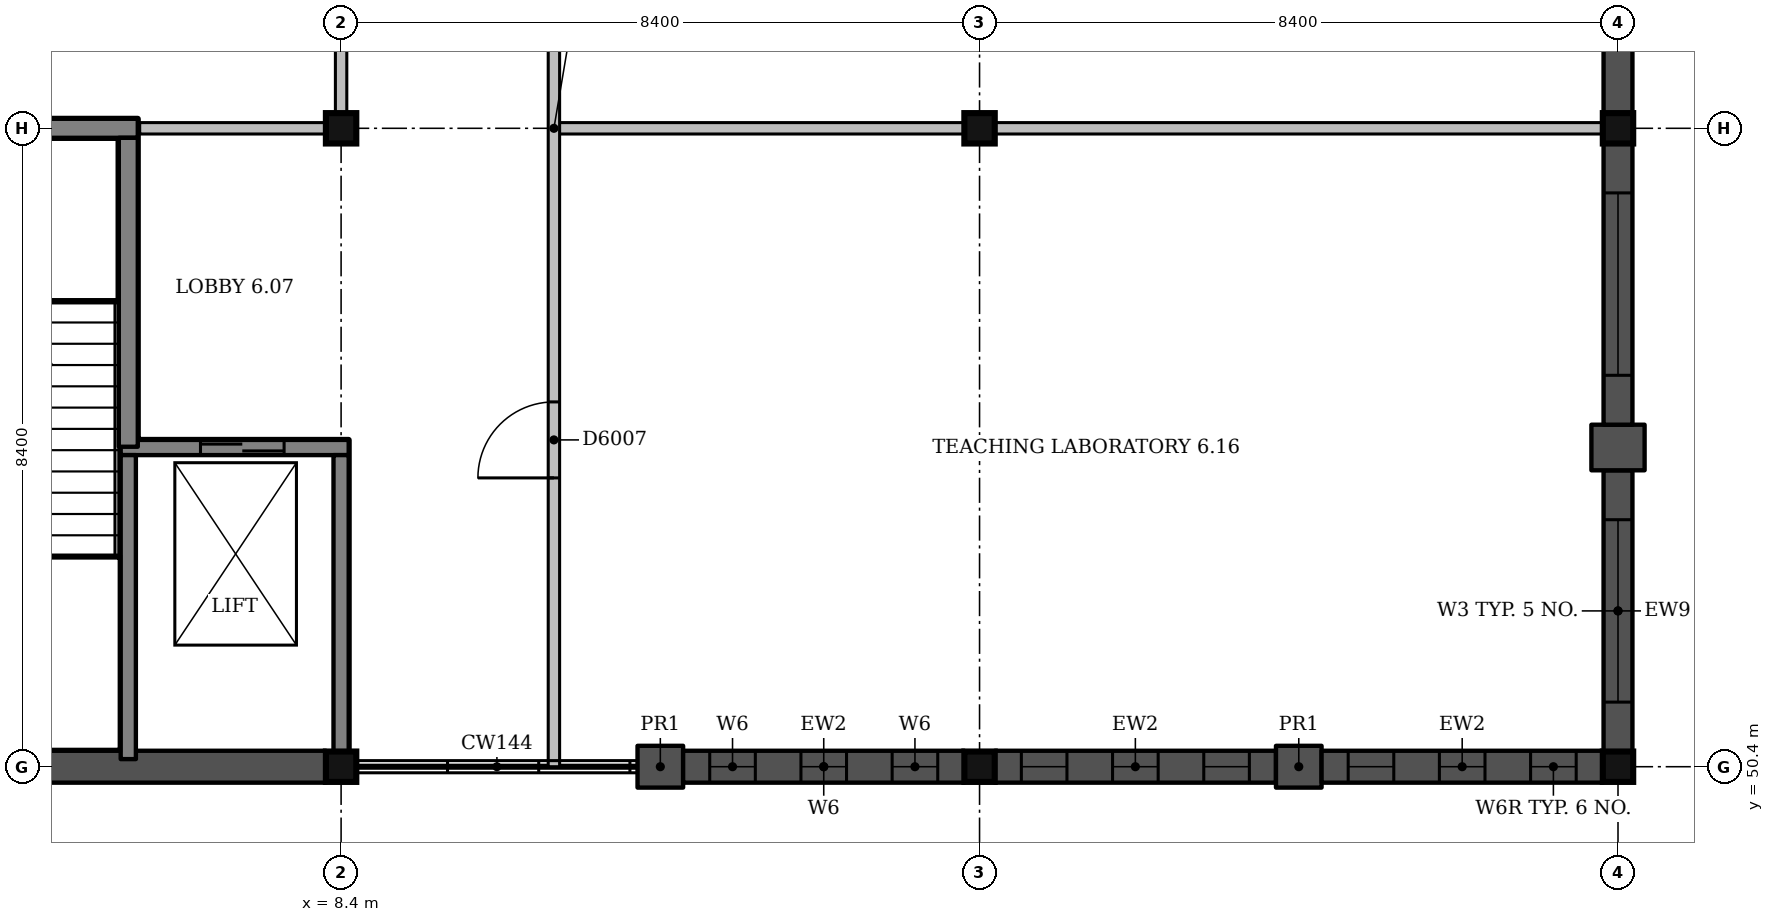
"""IFC4 building model, lengths in metres.
Left out: names, types, materials, properties, quantities, classifications, styles, units other than length and angle.
Written with IfcOpenShell. Run it as: python <this file> out.ifc"""

import sys

from ifc_helpers import new_model, si_unit, direction, frame, frame_2d, origin, origin_2d, place, context, subcontext, project, spatial, rectangle, extrude, element, fill, save


model = new_model("IFC4")
c1 = context("Model", 3, precision=1e-05, world=origin(), true_north=direction((0.0, 1.0)))
c2 = subcontext(c1, "Body", "Model", "MODEL_VIEW")
j1 = project(units=[si_unit("LENGTHUNIT", "METRE"), si_unit("PLANEANGLEUNIT", "RADIAN")], contexts=[c1])
p1 = place(None, origin())
s1 = spatial("IfcSite", under=j1, at=p1, CompositionType="ELEMENT")
p2 = place(p1, origin())
s2 = spatial("IfcBuilding", under=s1, at=p2, CompositionType="ELEMENT")
p3 = place(p2, frame((0.0, 0.0, 27.0)))
s3 = spatial("IfcBuildingStorey", under=s2, at=p3, CompositionType="ELEMENT", Elevation=27.0)
for number, where, z_axis, x_axis in (
    (1, (8.4, 50.4, 0.0), (0.0, 0.0, 1.0), (1.0, 0.0, 0.0)),
    (2, (8.4, 58.8, 0.0), (0.0, 0.0, 1.0), (1.0, 0.0, 0.0)),
    (3, (16.8, 50.4, 0.0), (0.0, 0.0, 1.0), (1.0, 0.0, 0.0)),
    (4, (16.8, 58.8, 0.0), (0.0, 0.0, 1.0), (1.0, 0.0, 0.0)),
    (5, (25.2, 50.4, 0.0), (0.0, 0.0, 1.0), (1.0, 0.0, 0.0)),
    (6, (25.2, 58.8, 0.0), (0.0, 0.0, 1.0), (1.0, 0.0, 0.0)),
):
    element("IfcColumn", number, at=place(p3, frame(where, z_axis=z_axis, x_axis=x_axis)), inside=s3, PredefinedType="COLUMN", context=c2, shape_type="SweptSolid", body=[
        extrude(rectangle(XDim=0.4, YDim=0.4, at=origin_2d()), origin(), (0.0, 0.0, 1.0), 4.5),
    ])
p4 = place(p3, frame((5.5, 54.6, 0.0), z_axis=(0.0, 0.0, 1.0), x_axis=(1.0, 0.0, 0.0)))
e7 = element("IfcWall", 7, at=p4, inside=s3, PredefinedType="SHEAR", context=c2, shape_type="SweptSolid", body=[
    extrude(rectangle(XDim=3.0, YDim=0.2, at=frame_2d((1.5, 0.0))), origin(), (0.0, 0.0, 1.0), 4.5),
])
p5 = place(p4, frame((1.05, 0.0, 0.0)))
e8 = element("IfcOpeningElement", 8, at=p5, cuts=e7, PredefinedType="OPENING", context=c2, shape_type="SweptSolid", body=[
    extrude(rectangle(XDim=1.1, YDim=2.1, at=frame_2d((0.55, 1.05))), frame((0.0, 0.11, 0.0), z_axis=(0.0, -1.0, 0.0), x_axis=(1.0, 0.0, 0.0)), (0.0, 0.0, 1.0), 0.22),
])
p6 = place(p3, frame((5.6, 50.5, 0.0), z_axis=(0.0, 0.0, 1.0), x_axis=(0.0, 1.0, 0.0)))
e9 = element("IfcWall", 9, at=p6, inside=s3, PredefinedType="SHEAR", context=c2, shape_type="SweptSolid", body=[
    extrude(rectangle(XDim=4.0, YDim=0.2, at=frame_2d((2.0, 0.0))), origin(), (0.0, 0.0, 1.0), 4.5),
])
p7 = place(p3, frame((8.4, 50.6, 0.0), z_axis=(0.0, 0.0, 1.0), x_axis=(0.0, 1.0, 0.0)))
e10 = element("IfcWall", 10, at=p7, inside=s3, PredefinedType="SHEAR", context=c2, shape_type="SweptSolid", body=[
    extrude(rectangle(XDim=3.9, YDim=0.2, at=frame_2d((1.95, 0.0))), origin(), (0.0, 0.0, 1.0), 4.5),
])
p8 = place(p3, frame((0.2, 58.8, 0.0), z_axis=(0.0, 0.0, 1.0), x_axis=(1.0, 0.0, 0.0)))
e11 = element("IfcWall", 11, at=p8, inside=s3, PredefinedType="SHEAR", context=c2, shape_type="SweptSolid", body=[
    extrude(rectangle(XDim=5.525, YDim=0.25, at=frame_2d((2.763, 0.0))), origin(), (0.0, 0.0, 1.0), 4.5),
])
p9 = place(p8, frame((2.15, 0.0, 0.0)))
e12 = element("IfcOpeningElement", 12, at=p9, cuts=e11, PredefinedType="OPENING", context=c2, shape_type="SweptSolid", body=[
    extrude(rectangle(XDim=1.0, YDim=2.1, at=frame_2d((0.5, 1.05))), frame((0.0, 0.135, 0.0), z_axis=(0.0, -1.0, 0.0), x_axis=(1.0, 0.0, 0.0)), (0.0, 0.0, 1.0), 0.27),
])
p10 = place(p3, frame((5.6, 54.61, 0.0), z_axis=(0.0, 0.0, 1.0), x_axis=(0.0, 1.0, 0.0)))
e13 = element("IfcWall", 13, at=p10, inside=s3, PredefinedType="SHEAR", context=c2, shape_type="SweptSolid", body=[
    extrude(rectangle(XDim=4.065, YDim=0.25, at=frame_2d((2.032, 0.0))), origin(), (0.0, 0.0, 1.0), 4.5),
])
p11 = place(p3, frame((25.2, 50.6, 0.0), z_axis=(0.0, 0.0, 1.0), x_axis=(0.0, 1.0, 0.0)))
e14 = element("IfcWall", 14, at=p11, inside=s3, PredefinedType="SOLIDWALL", context=c2, shape_type="SweptSolid", body=[
    extrude(rectangle(XDim=3.7, YDim=0.38, at=frame_2d((1.85, 0.0))), origin(), (0.0, 0.0, 1.0), 4.2),
])
p12 = place(p11, frame((0.65, 0.0, 1.2)))
e15 = element("IfcOpeningElement", 15, at=p12, cuts=e14, PredefinedType="OPENING", context=c2, shape_type="SweptSolid", body=[
    extrude(rectangle(XDim=2.4, YDim=1.5, at=frame_2d((1.2, 0.75))), frame((0.0, 0.2, 0.0), z_axis=(0.0, -1.0, 0.0), x_axis=(1.0, 0.0, 0.0)), (0.0, 0.0, 1.0), 0.4),
])
p13 = place(p3, frame((25.2, 54.3, 0.0), z_axis=(0.0, 0.0, 1.0), x_axis=(0.0, 1.0, 0.0)))
e16 = element("IfcWall", 16, at=p13, inside=s3, PredefinedType="SOLIDWALL", context=c2, shape_type="SweptSolid", body=[
    extrude(rectangle(XDim=0.6, YDim=0.7, at=frame_2d((0.3, 0.0))), origin(), (0.0, 0.0, 1.0), 4.2),
])
p14 = place(p3, frame((25.2, 54.9, 0.0), z_axis=(0.0, 0.0, 1.0), x_axis=(0.0, 1.0, 0.0)))
e17 = element("IfcWall", 17, at=p14, inside=s3, PredefinedType="SOLIDWALL", context=c2, shape_type="SweptSolid", body=[
    extrude(rectangle(XDim=3.7, YDim=0.38, at=frame_2d((1.85, 0.0))), origin(), (0.0, 0.0, 1.0), 4.2),
])
p15 = place(p14, frame((0.65, 0.0, 1.2)))
e18 = element("IfcOpeningElement", 18, at=p15, cuts=e17, PredefinedType="OPENING", context=c2, shape_type="SweptSolid", body=[
    extrude(rectangle(XDim=2.4, YDim=1.5, at=frame_2d((1.2, 0.75))), frame((0.0, 0.2, 0.0), z_axis=(0.0, -1.0, 0.0), x_axis=(1.0, 0.0, 0.0)), (0.0, 0.0, 1.0), 0.4),
])
p16 = place(p3, frame((25.2, 59.0, 0.0), z_axis=(0.0, 0.0, 1.0), x_axis=(0.0, 1.0, 0.0)))
e19 = element("IfcWall", 19, at=p16, inside=s3, PredefinedType="SOLIDWALL", context=c2, shape_type="SweptSolid", body=[
    extrude(rectangle(XDim=2.367, YDim=0.38, at=frame_2d((1.183, 0.0))), origin(), (0.0, 0.0, 1.0), 3.35),
])
p17 = place(p3, frame((4.5, 50.4, 0.0), z_axis=(0.0, 0.0, 1.0), x_axis=(1.0, 0.0, 0.0)))
e20 = element("IfcWall", 20, at=p17, inside=s3, PredefinedType="SOLIDWALL", context=c2, shape_type="SweptSolid", body=[
    extrude(rectangle(XDim=3.7, YDim=0.42, at=frame_2d((1.85, 0.0))), origin(), (0.0, 0.0, 1.0), 3.65),
])
p18 = place(p3, frame((12.3, 50.4, 0.0), z_axis=(0.0, 0.0, 1.0), x_axis=(1.0, 0.0, 0.0)))
e21 = element("IfcWall", 21, at=p18, inside=s3, PredefinedType="SOLIDWALL", context=c2, shape_type="SweptSolid", body=[
    extrude(rectangle(XDim=0.6, YDim=0.55, at=frame_2d((0.3, 0.0))), origin(), (0.0, 0.0, 1.0), 4.2),
])
p19 = place(p3, frame((12.9, 50.4, 0.0), z_axis=(0.0, 0.0, 1.0), x_axis=(1.0, 0.0, 0.0)))
e22 = element("IfcWall", 22, at=p19, inside=s3, PredefinedType="SOLIDWALL", context=c2, shape_type="SweptSolid", body=[
    extrude(rectangle(XDim=3.7, YDim=0.42, at=frame_2d((1.85, 0.0))), origin(), (0.0, 0.0, 1.0), 4.2),
])
p20 = place(p19, frame((0.35, 0.0, 1.0)))
e23 = element("IfcOpeningElement", 23, at=p20, cuts=e22, PredefinedType="OPENING", context=c2, shape_type="SweptSolid", body=[
    extrude(rectangle(XDim=0.6, YDim=2.1, at=frame_2d((0.3, 1.05))), frame((0.0, 0.22, 0.0), z_axis=(0.0, -1.0, 0.0), x_axis=(1.0, 0.0, 0.0)), (0.0, 0.0, 1.0), 0.44),
])
p21 = place(p19, frame((1.55, 0.0, 1.0)))
e24 = element("IfcOpeningElement", 24, at=p21, cuts=e22, PredefinedType="OPENING", context=c2, shape_type="SweptSolid", body=[
    extrude(rectangle(XDim=0.6, YDim=2.1, at=frame_2d((0.3, 1.05))), frame((0.0, 0.22, 0.0), z_axis=(0.0, -1.0, 0.0), x_axis=(1.0, 0.0, 0.0)), (0.0, 0.0, 1.0), 0.44),
])
p22 = place(p19, frame((2.75, 0.0, 1.0)))
e25 = element("IfcOpeningElement", 25, at=p22, cuts=e22, PredefinedType="OPENING", context=c2, shape_type="SweptSolid", body=[
    extrude(rectangle(XDim=0.6, YDim=2.1, at=frame_2d((0.3, 1.05))), frame((0.0, 0.22, 0.0), z_axis=(0.0, -1.0, 0.0), x_axis=(1.0, 0.0, 0.0)), (0.0, 0.0, 1.0), 0.44),
])
p23 = place(p3, frame((17.0, 50.4, 0.0), z_axis=(0.0, 0.0, 1.0), x_axis=(1.0, 0.0, 0.0)))
e26 = element("IfcWall", 26, at=p23, inside=s3, PredefinedType="SOLIDWALL", context=c2, shape_type="SweptSolid", body=[
    extrude(rectangle(XDim=3.7, YDim=0.42, at=frame_2d((1.85, 0.0))), origin(), (0.0, 0.0, 1.0), 3.35),
])
p24 = place(p23, frame((0.35, 0.0, 1.0)))
e27 = element("IfcOpeningElement", 27, at=p24, cuts=e26, PredefinedType="OPENING", context=c2, shape_type="SweptSolid", body=[
    extrude(rectangle(XDim=0.6, YDim=1.8, at=frame_2d((0.3, 0.9))), frame((0.0, 0.22, 0.0), z_axis=(0.0, -1.0, 0.0), x_axis=(1.0, 0.0, 0.0)), (0.0, 0.0, 1.0), 0.44),
])
p25 = place(p23, frame((1.55, 0.0, 1.0)))
e28 = element("IfcOpeningElement", 28, at=p25, cuts=e26, PredefinedType="OPENING", context=c2, shape_type="SweptSolid", body=[
    extrude(rectangle(XDim=0.6, YDim=1.8, at=frame_2d((0.3, 0.9))), frame((0.0, 0.22, 0.0), z_axis=(0.0, -1.0, 0.0), x_axis=(1.0, 0.0, 0.0)), (0.0, 0.0, 1.0), 0.44),
])
p26 = place(p23, frame((2.75, 0.0, 1.0)))
e29 = element("IfcOpeningElement", 29, at=p26, cuts=e26, PredefinedType="OPENING", context=c2, shape_type="SweptSolid", body=[
    extrude(rectangle(XDim=0.6, YDim=1.8, at=frame_2d((0.3, 0.9))), frame((0.0, 0.22, 0.0), z_axis=(0.0, -1.0, 0.0), x_axis=(1.0, 0.0, 0.0)), (0.0, 0.0, 1.0), 0.44),
])
p27 = place(p3, frame((20.7, 50.4, 0.0), z_axis=(0.0, 0.0, 1.0), x_axis=(1.0, 0.0, 0.0)))
e30 = element("IfcWall", 30, at=p27, inside=s3, PredefinedType="SOLIDWALL", context=c2, shape_type="SweptSolid", body=[
    extrude(rectangle(XDim=0.6, YDim=0.55, at=frame_2d((0.3, 0.0))), origin(), (0.0, 0.0, 1.0), 3.35),
])
p28 = place(p3, frame((21.3, 50.4, 0.0), z_axis=(0.0, 0.0, 1.0), x_axis=(1.0, 0.0, 0.0)))
e31 = element("IfcWall", 31, at=p28, inside=s3, PredefinedType="SOLIDWALL", context=c2, shape_type="SweptSolid", body=[
    extrude(rectangle(XDim=3.7, YDim=0.42, at=frame_2d((1.85, 0.0))), origin(), (0.0, 0.0, 1.0), 3.35),
])
p29 = place(p28, frame((0.35, 0.0, 1.0)))
e32 = element("IfcOpeningElement", 32, at=p29, cuts=e31, PredefinedType="OPENING", context=c2, shape_type="SweptSolid", body=[
    extrude(rectangle(XDim=0.6, YDim=1.8, at=frame_2d((0.3, 0.9))), frame((0.0, 0.22, 0.0), z_axis=(0.0, -1.0, 0.0), x_axis=(1.0, 0.0, 0.0)), (0.0, 0.0, 1.0), 0.44),
])
p30 = place(p28, frame((1.55, 0.0, 1.0)))
e33 = element("IfcOpeningElement", 33, at=p30, cuts=e31, PredefinedType="OPENING", context=c2, shape_type="SweptSolid", body=[
    extrude(rectangle(XDim=0.6, YDim=1.8, at=frame_2d((0.3, 0.9))), frame((0.0, 0.22, 0.0), z_axis=(0.0, -1.0, 0.0), x_axis=(1.0, 0.0, 0.0)), (0.0, 0.0, 1.0), 0.44),
])
p31 = place(p28, frame((2.75, 0.0, 1.0)))
e34 = element("IfcOpeningElement", 34, at=p31, cuts=e31, PredefinedType="OPENING", context=c2, shape_type="SweptSolid", body=[
    extrude(rectangle(XDim=0.6, YDim=1.8, at=frame_2d((0.3, 0.9))), frame((0.0, 0.22, 0.0), z_axis=(0.0, -1.0, 0.0), x_axis=(1.0, 0.0, 0.0)), (0.0, 0.0, 1.0), 0.44),
])
p32 = place(p3, frame((11.2, 58.8, 0.0), z_axis=(0.0, 0.0, 1.0), x_axis=(1.0, 0.0, 0.0)))
e35 = element("IfcWall", 35, at=p32, inside=s3, PredefinedType="PARTITIONING", context=c2, shape_type="SweptSolid", body=[
    extrude(rectangle(XDim=5.4, YDim=0.15, at=frame_2d((2.7, 0.0))), origin(), (0.0, 0.0, 1.0), 3.4),
])
p33 = place(p3, frame((17.0, 58.8, 0.0), z_axis=(0.0, 0.0, 1.0), x_axis=(1.0, 0.0, 0.0)))
e36 = element("IfcWall", 36, at=p33, inside=s3, PredefinedType="PARTITIONING", context=c2, shape_type="SweptSolid", body=[
    extrude(rectangle(XDim=8.0, YDim=0.15, at=frame_2d((4.0, 0.0))), origin(), (0.0, 0.0, 1.0), 3.35),
])
p34 = place(p3, frame((5.75, 58.8, 0.0), z_axis=(0.0, 0.0, 1.0), x_axis=(1.0, 0.0, 0.0)))
e37 = element("IfcWall", 37, at=p34, inside=s3, PredefinedType="PARTITIONING", context=c2, shape_type="SweptSolid", body=[
    extrude(rectangle(XDim=2.45, YDim=0.15, at=frame_2d((1.225, 0.0))), origin(), (0.0, 0.0, 1.0), 3.4),
])
p35 = place(p3, frame((8.4, 59.0, 0.0), z_axis=(0.0, 0.0, 1.0), x_axis=(0.0, 1.0, 0.0)))
e38 = element("IfcWall", 38, at=p35, inside=s3, PredefinedType="PARTITIONING", context=c2, shape_type="SweptSolid", body=[
    extrude(rectangle(XDim=8.0, YDim=0.15, at=frame_2d((4.0, 0.0))), origin(), (0.0, 0.0, 1.0), 3.4),
])
p36 = place(p35, frame((3.45, 0.0, 0.0)))
e39 = element("IfcOpeningElement", 39, at=p36, cuts=e38, PredefinedType="OPENING", context=c2, shape_type="SweptSolid", body=[
    extrude(rectangle(XDim=1.0, YDim=2.1, at=frame_2d((0.5, 1.05))), frame((0.0, 0.085, 0.0), z_axis=(0.0, -1.0, 0.0), x_axis=(1.0, 0.0, 0.0)), (0.0, 0.0, 1.0), 0.17),
])
p37 = place(p3, frame((11.2, 50.4, 0.0), z_axis=(0.0, 0.0, 1.0), x_axis=(0.0, 1.0, 0.0)))
e40 = element("IfcWall", 40, at=p37, inside=s3, PredefinedType="PARTITIONING", context=c2, shape_type="SweptSolid", body=[
    extrude(rectangle(XDim=16.8, YDim=0.15, at=frame_2d((8.4, 0.0))), origin(), (0.0, 0.0, 1.0), 2.37),
])
p38 = place(p37, frame((3.8, 0.0, 0.0)))
e41 = element("IfcOpeningElement", 41, at=p38, cuts=e40, PredefinedType="OPENING", context=c2, shape_type="SweptSolid", body=[
    extrude(rectangle(XDim=1.0, YDim=2.1, at=frame_2d((0.5, 1.05))), frame((0.0, 0.085, 0.0), z_axis=(0.0, -1.0, 0.0), x_axis=(1.0, 0.0, 0.0)), (0.0, 0.0, 1.0), 0.17),
])
p39 = place(p37, frame((12.2, 0.0, 0.0)))
e42 = element("IfcOpeningElement", 42, at=p39, cuts=e40, PredefinedType="OPENING", context=c2, shape_type="SweptSolid", body=[
    extrude(rectangle(XDim=1.0, YDim=2.1, at=frame_2d((0.5, 1.05))), frame((0.0, 0.085, 0.0), z_axis=(0.0, -1.0, 0.0), x_axis=(1.0, 0.0, 0.0)), (0.0, 0.0, 1.0), 0.17),
])
p40 = place(p12, origin())
e43 = element("IfcWindow", 43, at=p40, inside=s3, PartitioningType="SINGLE_PANEL", PredefinedType="WINDOW", context=c2, shape_type="SweptSolid", body=[
    extrude(rectangle(XDim=2.4, YDim=1.5, at=frame_2d((1.2, 0.75))), frame((0.0, 0.15, 0.0), z_axis=(0.0, -1.0, 0.0), x_axis=(1.0, 0.0, 0.0)), (0.0, 0.0, 1.0), 0.06),
])
fill(e15, e43)
p41 = place(p15, origin())
e44 = element("IfcWindow", 44, at=p41, inside=s3, PartitioningType="SINGLE_PANEL", PredefinedType="WINDOW", context=c2, shape_type="SweptSolid", body=[
    extrude(rectangle(XDim=2.4, YDim=1.5, at=frame_2d((1.2, 0.75))), frame((0.0, 0.15, 0.0), z_axis=(0.0, -1.0, 0.0), x_axis=(1.0, 0.0, 0.0)), (0.0, 0.0, 1.0), 0.06),
])
fill(e18, e44)
p42 = place(p20, origin())
e45 = element("IfcWindow", 45, at=p42, inside=s3, PartitioningType="SINGLE_PANEL", PredefinedType="WINDOW", context=c2, shape_type="SweptSolid", body=[
    extrude(rectangle(XDim=0.6, YDim=2.1, at=frame_2d((0.3, 1.05))), frame((0.0, 0.15, 0.0), z_axis=(0.0, -1.0, 0.0), x_axis=(1.0, 0.0, 0.0)), (0.0, 0.0, 1.0), 0.06),
])
fill(e23, e45)
p43 = place(p21, origin())
e46 = element("IfcWindow", 46, at=p43, inside=s3, PartitioningType="SINGLE_PANEL", PredefinedType="WINDOW", context=c2, shape_type="SweptSolid", body=[
    extrude(rectangle(XDim=0.6, YDim=2.1, at=frame_2d((0.3, 1.05))), frame((0.0, 0.15, 0.0), z_axis=(0.0, -1.0, 0.0), x_axis=(1.0, 0.0, 0.0)), (0.0, 0.0, 1.0), 0.06),
])
fill(e24, e46)
p44 = place(p22, origin())
e47 = element("IfcWindow", 47, at=p44, inside=s3, PartitioningType="SINGLE_PANEL", PredefinedType="WINDOW", context=c2, shape_type="SweptSolid", body=[
    extrude(rectangle(XDim=0.6, YDim=2.1, at=frame_2d((0.3, 1.05))), frame((0.0, 0.15, 0.0), z_axis=(0.0, -1.0, 0.0), x_axis=(1.0, 0.0, 0.0)), (0.0, 0.0, 1.0), 0.06),
])
fill(e25, e47)
p45 = place(p24, origin())
e48 = element("IfcWindow", 48, at=p45, inside=s3, PartitioningType="SINGLE_PANEL", PredefinedType="WINDOW", context=c2, shape_type="SweptSolid", body=[
    extrude(rectangle(XDim=0.6, YDim=1.8, at=frame_2d((0.3, 0.9))), frame((0.0, 0.15, 0.0), z_axis=(0.0, -1.0, 0.0), x_axis=(1.0, 0.0, 0.0)), (0.0, 0.0, 1.0), 0.06),
])
fill(e27, e48)
p46 = place(p25, origin())
e49 = element("IfcWindow", 49, at=p46, inside=s3, PartitioningType="SINGLE_PANEL", PredefinedType="WINDOW", context=c2, shape_type="SweptSolid", body=[
    extrude(rectangle(XDim=0.6, YDim=1.8, at=frame_2d((0.3, 0.9))), frame((0.0, 0.15, 0.0), z_axis=(0.0, -1.0, 0.0), x_axis=(1.0, 0.0, 0.0)), (0.0, 0.0, 1.0), 0.06),
])
fill(e28, e49)
p47 = place(p26, origin())
e50 = element("IfcWindow", 50, at=p47, inside=s3, PartitioningType="SINGLE_PANEL", PredefinedType="WINDOW", context=c2, shape_type="SweptSolid", body=[
    extrude(rectangle(XDim=0.6, YDim=1.8, at=frame_2d((0.3, 0.9))), frame((0.0, 0.15, 0.0), z_axis=(0.0, -1.0, 0.0), x_axis=(1.0, 0.0, 0.0)), (0.0, 0.0, 1.0), 0.06),
])
fill(e29, e50)
p48 = place(p29, origin())
e51 = element("IfcWindow", 51, at=p48, inside=s3, PartitioningType="SINGLE_PANEL", PredefinedType="WINDOW", context=c2, shape_type="SweptSolid", body=[
    extrude(rectangle(XDim=0.6, YDim=1.8, at=frame_2d((0.3, 0.9))), frame((0.0, 0.15, 0.0), z_axis=(0.0, -1.0, 0.0), x_axis=(1.0, 0.0, 0.0)), (0.0, 0.0, 1.0), 0.06),
])
fill(e32, e51)
p49 = place(p30, origin())
e52 = element("IfcWindow", 52, at=p49, inside=s3, PartitioningType="SINGLE_PANEL", PredefinedType="WINDOW", context=c2, shape_type="SweptSolid", body=[
    extrude(rectangle(XDim=0.6, YDim=1.8, at=frame_2d((0.3, 0.9))), frame((0.0, 0.15, 0.0), z_axis=(0.0, -1.0, 0.0), x_axis=(1.0, 0.0, 0.0)), (0.0, 0.0, 1.0), 0.06),
])
fill(e33, e52)
p50 = place(p31, origin())
e53 = element("IfcWindow", 53, at=p50, inside=s3, PartitioningType="SINGLE_PANEL", PredefinedType="WINDOW", context=c2, shape_type="SweptSolid", body=[
    extrude(rectangle(XDim=0.6, YDim=1.8, at=frame_2d((0.3, 0.9))), frame((0.0, 0.15, 0.0), z_axis=(0.0, -1.0, 0.0), x_axis=(1.0, 0.0, 0.0)), (0.0, 0.0, 1.0), 0.06),
])
fill(e34, e53)
p51 = place(p38, origin())
e54 = element("IfcDoor", 54, at=p51, inside=s3, OperationType="SINGLE_SWING_LEFT", PredefinedType="DOOR", context=c2, shape_type="SweptSolid", body=[
    extrude(rectangle(XDim=1.0, YDim=2.1, at=frame_2d((0.5, 1.05))), frame((0.0, 0.025, 0.0), z_axis=(0.0, -1.0, 0.0), x_axis=(1.0, 0.0, 0.0)), (0.0, 0.0, 1.0), 0.05),
])
fill(e41, e54)
p52 = place(p5, origin())
e55 = element("IfcDoor", 55, at=p52, inside=s3, OperationType="SLIDING_TO_LEFT", PredefinedType="DOOR", context=c2, shape_type="SweptSolid", body=[
    extrude(rectangle(XDim=1.1, YDim=2.1, at=frame_2d((0.55, 1.05))), frame((0.0, 0.025, 0.0), z_axis=(0.0, -1.0, 0.0), x_axis=(1.0, 0.0, 0.0)), (0.0, 0.0, 1.0), 0.05),
])
fill(e8, e55)
save(model, sys.argv[1])
